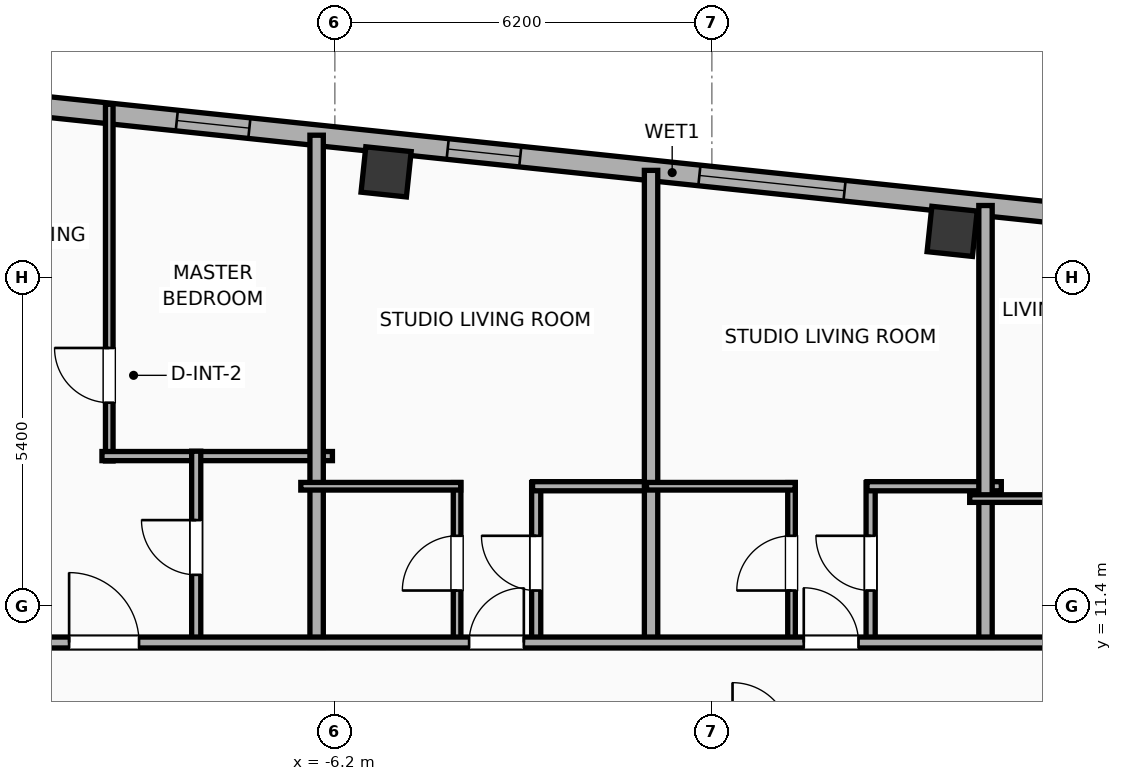
"""IFC4 building model, lengths in metres.
Left out: names, types, materials, properties, quantities, classifications, styles, units other than length and angle.
Written with IfcOpenShell. Run it as: python <this file> out.ifc"""

import sys

from ifc_helpers import new_model, si_unit, direction, frame, frame_2d, origin, origin_2d, place, context, subcontext, project, spatial, rectangle, hollow_rectangle, extrude, element, fill, save


model = new_model("IFC4")
c1 = context("Model", 3, precision=1e-05, world=origin(), true_north=direction((0.0, 1.0)))
c2 = subcontext(c1, "Body", "Model", "MODEL_VIEW")
j1 = project(units=[si_unit("LENGTHUNIT", "METRE"), si_unit("PLANEANGLEUNIT", "RADIAN")], contexts=[c1])
p1 = place(None, origin())
s1 = spatial("IfcSite", under=j1, at=p1, CompositionType="ELEMENT")
p2 = place(p1, origin())
s2 = spatial("IfcBuilding", under=s1, at=p2, CompositionType="ELEMENT")
p3 = place(p2, frame((0.0, 0.0, 283.4)))
s3 = spatial("IfcBuildingStorey", under=s2, at=p3, CompositionType="ELEMENT", Elevation=283.4)
for number, where, z_axis, x_axis in (
    (1, (3.952, 17.561, 0.0), (0.0, 0.0, 1.0), (0.995, -0.105, 0.0)),
    (2, (-5.357, 18.54, 0.0), (0.0, 0.0, 1.0), (0.995, -0.105, 0.0)),
):
    element("IfcColumn", number, at=place(p3, frame(where, z_axis=z_axis, x_axis=x_axis)), inside=s3, PredefinedType="COLUMN", context=c2, shape_type="SweptSolid", body=[
        extrude(hollow_rectangle(XDim=0.75, YDim=0.75, WallThickness=0.025, at=origin_2d()), origin(), (0.0, 0.0, 1.0), 3.9),
    ])
p4 = place(p3, frame((-23.908, 20.972, 0.0), z_axis=(0.0, 0.0, 1.0), x_axis=(0.994521888554, -0.104528528102, 0.0)))
e3 = element("IfcWall", 3, at=p4, inside=s3, PredefinedType="ELEMENTEDWALL", context=c2, shape_type="SweptSolid", body=[
    extrude(rectangle(XDim=46.766, YDim=0.34, at=frame_2d((23.383, 0.0))), origin(), (0.0, 0.0, 1.0), 3.65),
])
p5 = place(p4, frame((23.833, 0.0, 0.75)))
e4 = element("IfcOpeningElement", 4, at=p5, cuts=e3, PredefinedType="OPENING", context=c2, shape_type="SweptSolid", body=[
    extrude(rectangle(XDim=2.4, YDim=2.1, at=frame_2d((1.2, 1.05))), frame((0.0, 0.18, 0.0), z_axis=(0.0, -1.0, 0.0), x_axis=(1.0, 0.0, 0.0)), (0.0, 0.0, 1.0), 0.36),
])
p6 = place(p4, frame((1.243, 0.0, 0.75)))
e5 = element("IfcOpeningElement", 5, at=p6, cuts=e3, PredefinedType="OPENING", context=c2, shape_type="SweptSolid", body=[
    extrude(rectangle(XDim=1.2, YDim=2.05, at=frame_2d((0.6, 1.025))), frame((0.0, 0.18, 0.0), z_axis=(0.0, -1.0, 0.0), x_axis=(1.0, 0.0, 0.0)), (0.0, 0.0, 1.0), 0.36),
])
p7 = place(p4, frame((4.157, 0.0, 0.75)))
e6 = element("IfcOpeningElement", 6, at=p7, cuts=e3, PredefinedType="OPENING", context=c2, shape_type="SweptSolid", body=[
    extrude(rectangle(XDim=1.2, YDim=2.05, at=frame_2d((0.6, 1.025))), frame((0.0, 0.18, 0.0), z_axis=(0.0, -1.0, 0.0), x_axis=(1.0, 0.0, 0.0)), (0.0, 0.0, 1.0), 0.36),
])
p8 = place(p4, frame((7.475, 0.0, 0.75)))
e7 = element("IfcOpeningElement", 7, at=p8, cuts=e3, PredefinedType="OPENING", context=c2, shape_type="SweptSolid", body=[
    extrude(rectangle(XDim=1.2, YDim=2.05, at=frame_2d((0.6, 1.025))), frame((0.0, 0.18, 0.0), z_axis=(0.0, -1.0, 0.0), x_axis=(1.0, 0.0, 0.0)), (0.0, 0.0, 1.0), 0.36),
])
p9 = place(p4, frame((11.513, 0.0, 0.75)))
e8 = element("IfcOpeningElement", 8, at=p9, cuts=e3, PredefinedType="OPENING", context=c2, shape_type="SweptSolid", body=[
    extrude(rectangle(XDim=1.2, YDim=2.05, at=frame_2d((0.6, 1.025))), frame((0.0, 0.18, 0.0), z_axis=(0.0, -1.0, 0.0), x_axis=(1.0, 0.0, 0.0)), (0.0, 0.0, 1.0), 0.36),
])
p10 = place(p4, frame((15.192, 0.0, 0.75)))
e9 = element("IfcOpeningElement", 9, at=p10, cuts=e3, PredefinedType="OPENING", context=c2, shape_type="SweptSolid", body=[
    extrude(rectangle(XDim=1.2, YDim=2.05, at=frame_2d((0.6, 1.025))), frame((0.0, 0.18, 0.0), z_axis=(0.0, -1.0, 0.0), x_axis=(1.0, 0.0, 0.0)), (0.0, 0.0, 1.0), 0.36),
])
p11 = place(p4, frame((19.671, 0.0, 0.75)))
e10 = element("IfcOpeningElement", 10, at=p11, cuts=e3, PredefinedType="OPENING", context=c2, shape_type="SweptSolid", body=[
    extrude(rectangle(XDim=1.2, YDim=2.05, at=frame_2d((0.6, 1.025))), frame((0.0, 0.18, 0.0), z_axis=(0.0, -1.0, 0.0), x_axis=(1.0, 0.0, 0.0)), (0.0, 0.0, 1.0), 0.36),
])
p12 = place(p4, frame((29.801, 0.0, 0.75)))
e11 = element("IfcOpeningElement", 11, at=p12, cuts=e3, PredefinedType="OPENING", context=c2, shape_type="SweptSolid", body=[
    extrude(rectangle(XDim=1.2, YDim=2.05, at=frame_2d((0.6, 1.025))), frame((0.0, 0.18, 0.0), z_axis=(0.0, -1.0, 0.0), x_axis=(1.0, 0.0, 0.0)), (0.0, 0.0, 1.0), 0.36),
])
p13 = place(p4, frame((33.35, 0.0, 0.75)))
e12 = element("IfcOpeningElement", 12, at=p13, cuts=e3, PredefinedType="OPENING", context=c2, shape_type="SweptSolid", body=[
    extrude(rectangle(XDim=1.2, YDim=2.05, at=frame_2d((0.6, 1.025))), frame((0.0, 0.18, 0.0), z_axis=(0.0, -1.0, 0.0), x_axis=(1.0, 0.0, 0.0)), (0.0, 0.0, 1.0), 0.36),
])
p14 = place(p4, frame((38.034, 0.0, 0.75)))
e13 = element("IfcOpeningElement", 13, at=p14, cuts=e3, PredefinedType="OPENING", context=c2, shape_type="SweptSolid", body=[
    extrude(rectangle(XDim=0.85, YDim=2.05, at=frame_2d((0.425, 1.025))), frame((0.0, 0.18, 0.0), z_axis=(0.0, -1.0, 0.0), x_axis=(1.0, 0.0, 0.0)), (0.0, 0.0, 1.0), 0.36),
])
p15 = place(p4, frame((40.448, 0.0, 0.75)))
e14 = element("IfcOpeningElement", 14, at=p15, cuts=e3, PredefinedType="OPENING", context=c2, shape_type="SweptSolid", body=[
    extrude(rectangle(XDim=1.2, YDim=2.05, at=frame_2d((0.6, 1.025))), frame((0.0, 0.18, 0.0), z_axis=(0.0, -1.0, 0.0), x_axis=(1.0, 0.0, 0.0)), (0.0, 0.0, 1.0), 0.36),
])
p16 = place(p4, frame((43.718, 0.0, 0.75)))
e15 = element("IfcOpeningElement", 15, at=p16, cuts=e3, PredefinedType="OPENING", context=c2, shape_type="SweptSolid", body=[
    extrude(rectangle(XDim=1.2, YDim=2.05, at=frame_2d((0.6, 1.025))), frame((0.0, 0.18, 0.0), z_axis=(0.0, -1.0, 0.0), x_axis=(1.0, 0.0, 0.0)), (0.0, 0.0, 1.0), 0.36),
])
p17 = place(p3, frame((-9.91, 13.786, 0.0), z_axis=(0.0, 0.0, 1.0), x_axis=(0.0, 1.0, 0.0)))
e16 = element("IfcWall", 16, at=p17, inside=s3, PredefinedType="PARTITIONING", context=c2, shape_type="SweptSolid", body=[
    extrude(rectangle(XDim=5.866, YDim=0.125, at=frame_2d((2.933, 0.0))), origin(), (0.0, 0.0, 1.0), 3.65),
])
p18 = place(p17, frame((0.958, 0.0, 0.0)))
e17 = element("IfcOpeningElement", 17, at=p18, cuts=e16, PredefinedType="OPENING", context=c2, shape_type="SweptSolid", body=[
    extrude(rectangle(XDim=0.9, YDim=2.05, at=frame_2d((0.45, 1.025))), frame((0.0, 0.073, 0.0), z_axis=(0.0, -1.0, 0.0), x_axis=(1.0, 0.0, 0.0)), (0.0, 0.0, 1.0), 0.145),
])
p19 = place(p3, frame((-10.03, 13.866, 0.0), z_axis=(0.0, 0.0, 1.0), x_axis=(1.0, 0.0, 0.0)))
e18 = element("IfcWall", 18, at=p19, inside=s3, PredefinedType="PLUMBINGWALL", context=c2, shape_type="SweptSolid", body=[
    extrude(rectangle(XDim=3.79, YDim=0.15, at=frame_2d((1.895, 0.0))), origin(), (0.0, 0.0, 1.0), 3.65),
])
p20 = place(p3, frame((-8.48, 10.78, 0.0), z_axis=(0.0, 0.0, 1.0), x_axis=(0.0, 1.0, 0.0)))
e19 = element("IfcWall", 19, at=p20, inside=s3, PredefinedType="PLUMBINGWALL", context=c2, shape_type="SweptSolid", body=[
    extrude(rectangle(XDim=3.166, YDim=0.15, at=frame_2d((1.583, 0.0))), origin(), (0.0, 0.0, 1.0), 3.65),
])
p21 = place(p20, frame((1.133, 0.0, 0.0)))
e20 = element("IfcOpeningElement", 20, at=p21, cuts=e19, PredefinedType="OPENING", context=c2, shape_type="SweptSolid", body=[
    extrude(rectangle(XDim=0.9, YDim=2.05, at=frame_2d((0.45, 1.025))), frame((0.0, 0.085, 0.0), z_axis=(0.0, -1.0, 0.0), x_axis=(1.0, 0.0, 0.0)), (0.0, 0.0, 1.0), 0.17),
])
p22 = place(p3, frame((-6.5, 10.72, 0.0), z_axis=(0.0, 0.0, 1.0), x_axis=(0.0, 1.0, 0.0)))
e21 = element("IfcWall", 21, at=p22, inside=s3, PredefinedType="PARTITIONING", context=c2, shape_type="SweptSolid", body=[
    extrude(rectangle(XDim=8.423, YDim=0.22, at=frame_2d((4.211, 0.0))), origin(), (0.0, 0.0, 1.0), 3.65),
])
p23 = place(p3, frame((-4.19, 10.78, 0.0), z_axis=(0.0, 0.0, 1.0), x_axis=(0.0, 1.0, 0.0)))
e22 = element("IfcWall", 22, at=p23, inside=s3, PredefinedType="PARTITIONING", context=c2, shape_type="SweptSolid", body=[
    extrude(rectangle(XDim=2.65, YDim=0.125, at=frame_2d((1.325, 0.0))), origin(), (0.0, 0.0, 1.0), 3.65),
])
p24 = place(p23, frame((0.875, 0.0, 0.0)))
e23 = element("IfcOpeningElement", 23, at=p24, cuts=e22, PredefinedType="OPENING", context=c2, shape_type="SweptSolid", body=[
    extrude(rectangle(XDim=0.9, YDim=2.05, at=frame_2d((0.45, 1.025))), frame((0.0, 0.073, 0.0), z_axis=(0.0, -1.0, 0.0), x_axis=(1.0, 0.0, 0.0)), (0.0, 0.0, 1.0), 0.145),
])
p25 = place(p3, frame((-2.889, 10.78, 0.0), z_axis=(0.0, 0.0, 1.0), x_axis=(0.0, 1.0, 0.0)))
e24 = element("IfcWall", 24, at=p25, inside=s3, PredefinedType="PLUMBINGWALL", context=c2, shape_type="SweptSolid", body=[
    extrude(rectangle(XDim=2.65, YDim=0.15, at=frame_2d((1.325, 0.0))), origin(), (0.0, 0.0, 1.0), 3.65),
])
p26 = place(p25, frame((0.875, 0.0, 0.0)))
e25 = element("IfcOpeningElement", 25, at=p26, cuts=e24, PredefinedType="OPENING", context=c2, shape_type="SweptSolid", body=[
    extrude(rectangle(XDim=0.9, YDim=2.05, at=frame_2d((0.45, 1.025))), frame((0.0, 0.085, 0.0), z_axis=(0.0, -1.0, 0.0), x_axis=(1.0, 0.0, 0.0)), (0.0, 0.0, 1.0), 0.17),
])
p27 = place(p3, frame((-6.76, 13.37, 0.0), z_axis=(0.0, 0.0, 1.0), x_axis=(1.0, 0.0, 0.0)))
e26 = element("IfcWall", 26, at=p27, inside=s3, PredefinedType="PARTITIONING", context=c2, shape_type="SweptSolid", body=[
    extrude(rectangle(XDim=2.63, YDim=0.125, at=frame_2d((1.315, 0.0))), origin(), (0.0, 0.0, 1.0), 3.65),
])
p28 = place(p3, frame((-2.949, 13.37, 0.0), z_axis=(0.0, 0.0, 1.0), x_axis=(1.0, 0.0, 0.0)))
e27 = element("IfcWall", 27, at=p28, inside=s3, PredefinedType="PLUMBINGWALL", context=c2, shape_type="SweptSolid", body=[
    extrude(rectangle(XDim=2.024, YDim=0.15, at=frame_2d((1.012, 0.0))), origin(), (0.0, 0.0, 1.0), 3.65),
])
p29 = place(p3, frame((-1.0, 10.72, 0.0), z_axis=(0.0, 0.0, 1.0), x_axis=(0.0, 1.0, 0.0)))
e28 = element("IfcWall", 28, at=p29, inside=s3, PredefinedType="PARTITIONING", context=c2, shape_type="SweptSolid", body=[
    extrude(rectangle(XDim=7.844, YDim=0.22, at=frame_2d((3.922, 0.0))), origin(), (0.0, 0.0, 1.0), 3.65),
])
p30 = place(p3, frame((1.31, 10.78, 0.0), z_axis=(0.0, 0.0, 1.0), x_axis=(0.0, 1.0, 0.0)))
e29 = element("IfcWall", 29, at=p30, inside=s3, PredefinedType="PARTITIONING", context=c2, shape_type="SweptSolid", body=[
    extrude(rectangle(XDim=2.65, YDim=0.125, at=frame_2d((1.325, 0.0))), origin(), (0.0, 0.0, 1.0), 3.65),
])
p31 = place(p30, frame((0.875, 0.0, 0.0)))
e30 = element("IfcOpeningElement", 30, at=p31, cuts=e29, PredefinedType="OPENING", context=c2, shape_type="SweptSolid", body=[
    extrude(rectangle(XDim=0.9, YDim=2.05, at=frame_2d((0.45, 1.025))), frame((0.0, 0.073, 0.0), z_axis=(0.0, -1.0, 0.0), x_axis=(1.0, 0.0, 0.0)), (0.0, 0.0, 1.0), 0.145),
])
p32 = place(p3, frame((2.611, 10.78, 0.0), z_axis=(0.0, 0.0, 1.0), x_axis=(0.0, 1.0, 0.0)))
e31 = element("IfcWall", 31, at=p32, inside=s3, PredefinedType="PLUMBINGWALL", context=c2, shape_type="SweptSolid", body=[
    extrude(rectangle(XDim=2.65, YDim=0.15, at=frame_2d((1.325, 0.0))), origin(), (0.0, 0.0, 1.0), 3.65),
])
p33 = place(p32, frame((0.875, 0.0, 0.0)))
e32 = element("IfcOpeningElement", 32, at=p33, cuts=e31, PredefinedType="OPENING", context=c2, shape_type="SweptSolid", body=[
    extrude(rectangle(XDim=0.9, YDim=2.05, at=frame_2d((0.45, 1.025))), frame((0.0, 0.085, 0.0), z_axis=(0.0, -1.0, 0.0), x_axis=(1.0, 0.0, 0.0)), (0.0, 0.0, 1.0), 0.17),
])
p34 = place(p3, frame((-1.075, 13.37, 0.0), z_axis=(0.0, 0.0, 1.0), x_axis=(1.0, 0.0, 0.0)))
e33 = element("IfcWall", 33, at=p34, inside=s3, PredefinedType="PARTITIONING", context=c2, shape_type="SweptSolid", body=[
    extrude(rectangle(XDim=2.445, YDim=0.125, at=frame_2d((1.223, 0.0))), origin(), (0.0, 0.0, 1.0), 3.65),
])
p35 = place(p3, frame((2.551, 13.37, 0.0), z_axis=(0.0, 0.0, 1.0), x_axis=(1.0, 0.0, 0.0)))
e34 = element("IfcWall", 34, at=p35, inside=s3, PredefinedType="PLUMBINGWALL", context=c2, shape_type="SweptSolid", body=[
    extrude(rectangle(XDim=2.209, YDim=0.15, at=frame_2d((1.104, 0.0))), origin(), (0.0, 0.0, 1.0), 3.65),
])
p36 = place(p3, frame((4.5, 10.72, 0.0), z_axis=(0.0, 0.0, 1.0), x_axis=(0.0, 1.0, 0.0)))
e35 = element("IfcWall", 35, at=p36, inside=s3, PredefinedType="PARTITIONING", context=c2, shape_type="SweptSolid", body=[
    extrude(rectangle(XDim=7.266, YDim=0.22, at=frame_2d((3.633, 0.0))), origin(), (0.0, 0.0, 1.0), 3.65),
])
p37 = place(p3, frame((4.24, 13.167, 0.0), z_axis=(0.0, 0.0, 1.0), x_axis=(1.0, 0.0, 0.0)))
e36 = element("IfcWall", 36, at=p37, inside=s3, PredefinedType="PARTITIONING", context=c2, shape_type="SweptSolid", body=[
    extrude(rectangle(XDim=2.69, YDim=0.125, at=frame_2d((1.345, 0.0))), origin(), (0.0, 0.0, 1.0), 3.65),
])
p38 = place(p3, frame((-28.443, 10.8, 0.0), z_axis=(0.0, 0.0, 1.0), x_axis=(1.0, 0.0, 0.0)))
e37 = element("IfcWall", 37, at=p38, inside=s3, PredefinedType="PARTITIONING", context=c2, shape_type="SweptSolid", body=[
    extrude(rectangle(XDim=53.956, YDim=0.18, at=frame_2d((26.978, 0.0))), origin(), (0.0, 0.0, 1.0), 3.65),
])
p39 = place(p38, frame((3.213, 0.0, 0.0)))
e38 = element("IfcOpeningElement", 38, at=p39, cuts=e37, PredefinedType="OPENING", context=c2, shape_type="SweptSolid", body=[
    extrude(rectangle(XDim=1.15, YDim=2.05, at=frame_2d((0.575, 1.025))), frame((0.0, 0.1, 0.0), z_axis=(0.0, -1.0, 0.0), x_axis=(1.0, 0.0, 0.0)), (0.0, 0.0, 1.0), 0.2),
])
p40 = place(p38, frame((10.556, 0.0, 0.0)))
e39 = element("IfcOpeningElement", 39, at=p40, cuts=e37, PredefinedType="OPENING", context=c2, shape_type="SweptSolid", body=[
    extrude(rectangle(XDim=1.15, YDim=2.05, at=frame_2d((0.575, 1.025))), frame((0.0, 0.1, 0.0), z_axis=(0.0, -1.0, 0.0), x_axis=(1.0, 0.0, 0.0)), (0.0, 0.0, 1.0), 0.2),
])
p41 = place(p38, frame((17.872, 0.0, 0.0)))
e40 = element("IfcOpeningElement", 40, at=p41, cuts=e37, PredefinedType="OPENING", context=c2, shape_type="SweptSolid", body=[
    extrude(rectangle(XDim=1.15, YDim=2.05, at=frame_2d((0.575, 1.025))), frame((0.0, 0.1, 0.0), z_axis=(0.0, -1.0, 0.0), x_axis=(1.0, 0.0, 0.0)), (0.0, 0.0, 1.0), 0.2),
])
p42 = place(p38, frame((24.45, 0.0, 0.0)))
e41 = element("IfcOpeningElement", 41, at=p42, cuts=e37, PredefinedType="OPENING", context=c2, shape_type="SweptSolid", body=[
    extrude(rectangle(XDim=0.9, YDim=2.05, at=frame_2d((0.45, 1.025))), frame((0.0, 0.1, 0.0), z_axis=(0.0, -1.0, 0.0), x_axis=(1.0, 0.0, 0.0)), (0.0, 0.0, 1.0), 0.2),
])
p43 = place(p38, frame((29.954, 0.0, 0.0)))
e42 = element("IfcOpeningElement", 42, at=p43, cuts=e37, PredefinedType="OPENING", context=c2, shape_type="SweptSolid", body=[
    extrude(rectangle(XDim=0.9, YDim=2.05, at=frame_2d((0.45, 1.025))), frame((0.0, 0.1, 0.0), z_axis=(0.0, -1.0, 0.0), x_axis=(1.0, 0.0, 0.0)), (0.0, 0.0, 1.0), 0.2),
])
p44 = place(p38, frame((36.186, 0.0, 0.0)))
e43 = element("IfcOpeningElement", 43, at=p44, cuts=e37, PredefinedType="OPENING", context=c2, shape_type="SweptSolid", body=[
    extrude(rectangle(XDim=0.9, YDim=2.05, at=frame_2d((0.45, 1.025))), frame((0.0, 0.1, 0.0), z_axis=(0.0, -1.0, 0.0), x_axis=(1.0, 0.0, 0.0)), (0.0, 0.0, 1.0), 0.2),
])
p45 = place(p38, frame((43.249, 0.0, 0.0)))
e44 = element("IfcOpeningElement", 44, at=p45, cuts=e37, PredefinedType="OPENING", context=c2, shape_type="SweptSolid", body=[
    extrude(rectangle(XDim=0.9, YDim=2.05, at=frame_2d((0.45, 1.025))), frame((0.0, 0.1, 0.0), z_axis=(0.0, -1.0, 0.0), x_axis=(1.0, 0.0, 0.0)), (0.0, 0.0, 1.0), 0.2),
])
p46 = place(p38, frame((50.311, 0.0, 0.0)))
e45 = element("IfcOpeningElement", 45, at=p46, cuts=e37, PredefinedType="OPENING", context=c2, shape_type="SweptSolid", body=[
    extrude(rectangle(XDim=0.9, YDim=2.05, at=frame_2d((0.45, 1.025))), frame((0.0, 0.1, 0.0), z_axis=(0.0, -1.0, 0.0), x_axis=(1.0, 0.0, 0.0)), (0.0, 0.0, 1.0), 0.2),
])
p47 = place(p5, origin())
e46 = element("IfcWindow", 46, at=p47, inside=s3, PartitioningType="SINGLE_PANEL", PredefinedType="WINDOW", context=c2, shape_type="SweptSolid", body=[
    extrude(rectangle(XDim=2.4, YDim=2.1, at=frame_2d((1.2, 1.05))), frame((0.0, 0.03, 0.0), z_axis=(0.0, -1.0, 0.0), x_axis=(1.0, 0.0, 0.0)), (0.0, 0.0, 1.0), 0.06),
])
fill(e4, e46)
p48 = place(p10, origin())
e47 = element("IfcWindow", 47, at=p48, inside=s3, PartitioningType="SINGLE_PANEL", PredefinedType="WINDOW", context=c2, shape_type="SweptSolid", body=[
    extrude(rectangle(XDim=1.2, YDim=2.05, at=frame_2d((0.6, 1.025))), frame((0.0, 0.03, 0.0), z_axis=(0.0, -1.0, 0.0), x_axis=(1.0, 0.0, 0.0)), (0.0, 0.0, 1.0), 0.06),
])
fill(e9, e47)
p49 = place(p11, origin())
e48 = element("IfcWindow", 48, at=p49, inside=s3, PartitioningType="SINGLE_PANEL", PredefinedType="WINDOW", context=c2, shape_type="SweptSolid", body=[
    extrude(rectangle(XDim=1.2, YDim=2.05, at=frame_2d((0.6, 1.025))), frame((0.0, 0.03, 0.0), z_axis=(0.0, -1.0, 0.0), x_axis=(1.0, 0.0, 0.0)), (0.0, 0.0, 1.0), 0.06),
])
fill(e10, e48)
p50 = place(p18, origin())
e49 = element("IfcDoor", 49, at=p50, inside=s3, OperationType="SINGLE_SWING_RIGHT", PredefinedType="DOOR", context=c2, shape_type="SweptSolid", body=[
    extrude(rectangle(XDim=0.9, YDim=2.05, at=frame_2d((0.45, 1.025))), frame((0.0, 0.025, 0.0), z_axis=(0.0, -1.0, 0.0), x_axis=(1.0, 0.0, 0.0)), (0.0, 0.0, 1.0), 0.05),
])
fill(e17, e49)
p51 = place(p21, origin())
e50 = element("IfcDoor", 50, at=p51, inside=s3, OperationType="SINGLE_SWING_RIGHT", PredefinedType="DOOR", context=c2, shape_type="SweptSolid", body=[
    extrude(rectangle(XDim=0.9, YDim=2.05, at=frame_2d((0.45, 1.025))), frame((0.0, 0.025, 0.0), z_axis=(0.0, -1.0, 0.0), x_axis=(1.0, 0.0, 0.0)), (0.0, 0.0, 1.0), 0.05),
])
fill(e20, e50)
p52 = place(p24, origin())
e51 = element("IfcDoor", 51, at=p52, inside=s3, OperationType="SINGLE_SWING_LEFT", PredefinedType="DOOR", context=c2, shape_type="SweptSolid", body=[
    extrude(rectangle(XDim=0.9, YDim=2.05, at=frame_2d((0.45, 1.025))), frame((0.0, 0.025, 0.0), z_axis=(0.0, -1.0, 0.0), x_axis=(1.0, 0.0, 0.0)), (0.0, 0.0, 1.0), 0.05),
])
fill(e23, e51)
p53 = place(p26, origin())
e52 = element("IfcDoor", 52, at=p53, inside=s3, OperationType="SINGLE_SWING_RIGHT", PredefinedType="DOOR", context=c2, shape_type="SweptSolid", body=[
    extrude(rectangle(XDim=0.9, YDim=2.05, at=frame_2d((0.45, 1.025))), frame((0.0, 0.025, 0.0), z_axis=(0.0, -1.0, 0.0), x_axis=(1.0, 0.0, 0.0)), (0.0, 0.0, 1.0), 0.05),
])
fill(e25, e52)
p54 = place(p31, origin())
e53 = element("IfcDoor", 53, at=p54, inside=s3, OperationType="SINGLE_SWING_LEFT", PredefinedType="DOOR", context=c2, shape_type="SweptSolid", body=[
    extrude(rectangle(XDim=0.9, YDim=2.05, at=frame_2d((0.45, 1.025))), frame((0.0, 0.025, 0.0), z_axis=(0.0, -1.0, 0.0), x_axis=(1.0, 0.0, 0.0)), (0.0, 0.0, 1.0), 0.05),
])
fill(e30, e53)
p55 = place(p33, origin())
e54 = element("IfcDoor", 54, at=p55, inside=s3, OperationType="SINGLE_SWING_RIGHT", PredefinedType="DOOR", context=c2, shape_type="SweptSolid", body=[
    extrude(rectangle(XDim=0.9, YDim=2.05, at=frame_2d((0.45, 1.025))), frame((0.0, 0.025, 0.0), z_axis=(0.0, -1.0, 0.0), x_axis=(1.0, 0.0, 0.0)), (0.0, 0.0, 1.0), 0.05),
])
fill(e32, e54)
p56 = place(p41, origin())
e55 = element("IfcDoor", 55, at=p56, inside=s3, OperationType="SINGLE_SWING_LEFT", PredefinedType="DOOR", context=c2, shape_type="SweptSolid", body=[
    extrude(rectangle(XDim=1.15, YDim=2.05, at=frame_2d((0.575, 1.025))), frame((0.0, 0.025, 0.0), z_axis=(0.0, -1.0, 0.0), x_axis=(1.0, 0.0, 0.0)), (0.0, 0.0, 1.0), 0.05),
])
fill(e40, e55)
p57 = place(p42, origin())
e56 = element("IfcDoor", 56, at=p57, inside=s3, OperationType="SINGLE_SWING_RIGHT", PredefinedType="DOOR", context=c2, shape_type="SweptSolid", body=[
    extrude(rectangle(XDim=0.9, YDim=2.05, at=frame_2d((0.45, 1.025))), frame((0.0, 0.025, 0.0), z_axis=(0.0, -1.0, 0.0), x_axis=(1.0, 0.0, 0.0)), (0.0, 0.0, 1.0), 0.05),
])
fill(e41, e56)
p58 = place(p43, origin())
e57 = element("IfcDoor", 57, at=p58, inside=s3, OperationType="SINGLE_SWING_LEFT", PredefinedType="DOOR", context=c2, shape_type="SweptSolid", body=[
    extrude(rectangle(XDim=0.9, YDim=2.05, at=frame_2d((0.45, 1.025))), frame((0.0, 0.025, 0.0), z_axis=(0.0, -1.0, 0.0), x_axis=(1.0, 0.0, 0.0)), (0.0, 0.0, 1.0), 0.05),
])
fill(e42, e57)
save(model, sys.argv[1])
